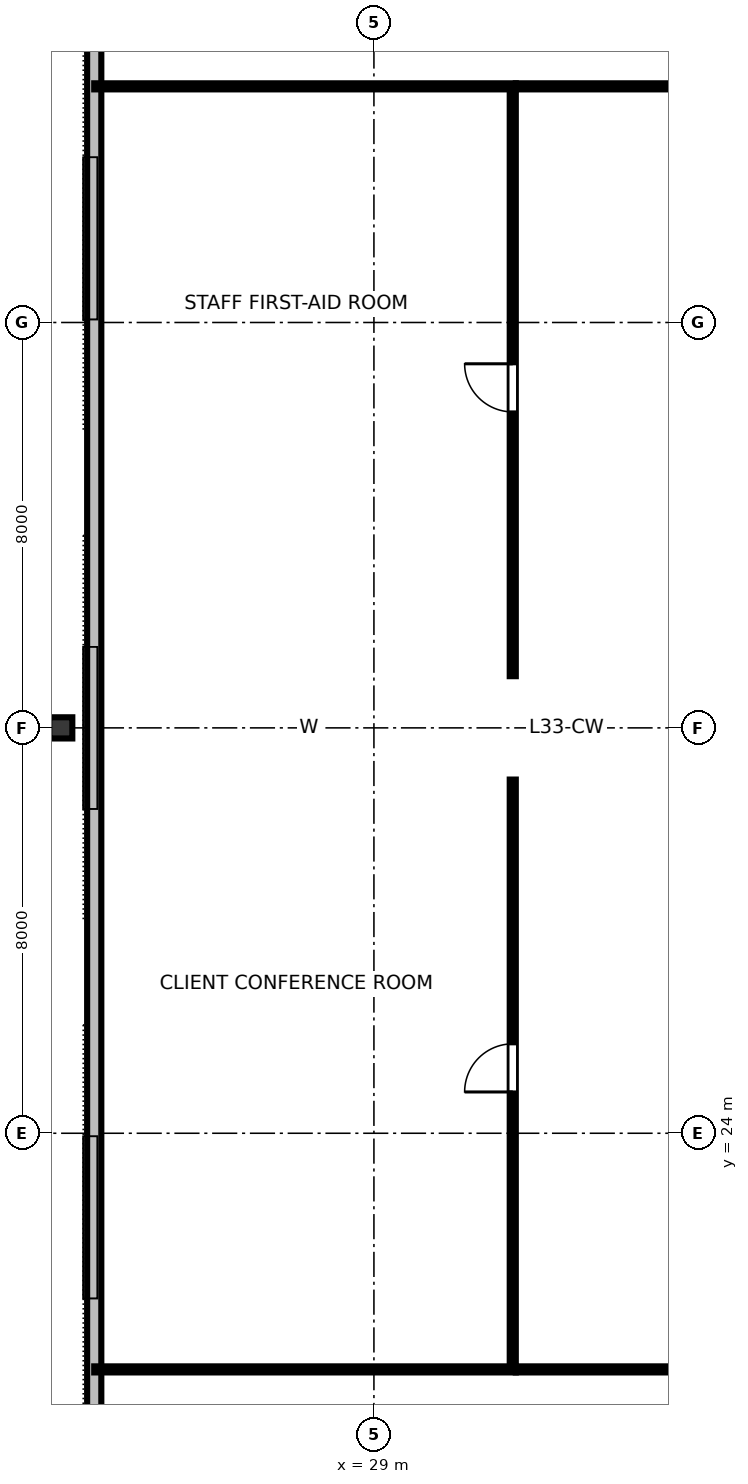
"""IFC4 building model, lengths in metres.
Left out: names, types, materials, properties, quantities, classifications, styles, units other than length and angle.
Written with IfcOpenShell. Run it as: python <this file> out.ifc"""

import sys

from ifc_helpers import new_model, si_unit, direction, frame, frame_2d, origin, origin_2d, place, context, subcontext, project, spatial, rectangle, i_section, extrude, element, fill, save


model = new_model("IFC4")
c1 = context("Model", 3, precision=1e-05, world=origin(), true_north=direction((0.0, 1.0)))
c2 = subcontext(c1, "Body", "Model", "MODEL_VIEW")
j1 = project(units=[si_unit("LENGTHUNIT", "METRE"), si_unit("PLANEANGLEUNIT", "RADIAN")], contexts=[c1])
p1 = place(None, origin())
s1 = spatial("IfcSite", under=j1, at=p1, CompositionType="ELEMENT")
p2 = place(p1, origin())
s2 = spatial("IfcBuilding", under=s1, at=p2, CompositionType="ELEMENT")
p3 = place(p2, frame((0.0, 0.0, 127.6)))
s3 = spatial("IfcBuildingStorey", under=s2, at=p3, CompositionType="ELEMENT", Elevation=127.6)
p4 = place(p3, frame((22.82, 32.0, 0.0), z_axis=(0.0, 0.0, 1.0), x_axis=(0.0, 1.0, 0.0)))
e1 = element("IfcColumn", 1, at=p4, inside=s3, PredefinedType="COLUMN", context=c2, shape_type="SweptSolid", body=[
    extrude(i_section(OverallWidth=0.418, OverallDepth=0.455, WebThickness=0.042, FlangeThickness=0.068, FilletRadius=0.025, at=origin_2d()), origin(), (0.0, 0.0, 1.0), 3.358),
])
p5 = place(p3, frame((23.48, 47.39, 0.0), z_axis=(0.0, 0.0, 1.0), x_axis=(0.0, -1.0, 0.0)))
e2 = element("IfcWall", 2, at=p5, inside=s3, PredefinedType="STANDARD", context=c2, shape_type="SweptSolid", body=[
    extrude(rectangle(XDim=30.78, YDim=0.28, at=frame_2d((15.39, 0.0))), origin(), (0.0, 0.0, 1.0), 3.36),
])
p6 = place(p3, frame((31.8, 19.34, 0.0), z_axis=(0.0, 0.0, 1.0), x_axis=(1.0, 0.0, 0.0)))
e3 = element("IfcWall", 3, at=p6, inside=s3, PredefinedType="PARTITIONING", context=c2, shape_type="SweptSolid", body=[
    extrude(rectangle(XDim=28.4, YDim=0.12, at=frame_2d((14.2, 0.0))), origin(), (0.0, 0.0, 1.0), 2.64),
])
p7 = place(p6, frame((4.955, 0.0, 0.0)))
e4 = element("IfcOpeningElement", 4, at=p7, cuts=e3, PredefinedType="OPENING", context=c2, shape_type="SweptSolid", body=[
    extrude(rectangle(XDim=0.95, YDim=2.15, at=frame_2d((0.475, 1.075))), frame((0.0, 0.07, 0.0), z_axis=(0.0, -1.0, 0.0), x_axis=(1.0, 0.0, 0.0)), (0.0, 0.0, 1.0), 0.14),
])
p8 = place(p6, frame((19.015, 0.0, 0.0)))
e5 = element("IfcOpeningElement", 5, at=p8, cuts=e3, PredefinedType="OPENING", context=c2, shape_type="SweptSolid", body=[
    extrude(rectangle(XDim=0.95, YDim=2.15, at=frame_2d((0.475, 1.075))), frame((0.0, 0.07, 0.0), z_axis=(0.0, -1.0, 0.0), x_axis=(1.0, 0.0, 0.0)), (0.0, 0.0, 1.0), 0.14),
])
p9 = place(p3, frame((31.8, 44.66, 0.0), z_axis=(0.0, 0.0, 1.0), x_axis=(1.0, 0.0, 0.0)))
e6 = element("IfcWall", 6, at=p9, inside=s3, PredefinedType="PARTITIONING", context=c2, shape_type="SweptSolid", body=[
    extrude(rectangle(XDim=28.4, YDim=0.12, at=frame_2d((14.2, 0.0))), origin(), (0.0, 0.0, 1.0), 2.64),
])
p10 = place(p9, frame((4.544, 0.0, 0.0)))
e7 = element("IfcOpeningElement", 7, at=p10, cuts=e6, PredefinedType="OPENING", context=c2, shape_type="SweptSolid", body=[
    extrude(rectangle(XDim=0.95, YDim=2.15, at=frame_2d((0.475, 1.075))), frame((0.0, 0.07, 0.0), z_axis=(0.0, -1.0, 0.0), x_axis=(1.0, 0.0, 0.0)), (0.0, 0.0, 1.0), 0.14),
])
p11 = place(p9, frame((11.807, 0.0, 0.0)))
e8 = element("IfcOpeningElement", 8, at=p11, cuts=e6, PredefinedType="OPENING", context=c2, shape_type="SweptSolid", body=[
    extrude(rectangle(XDim=0.95, YDim=2.15, at=frame_2d((0.475, 1.075))), frame((0.0, 0.07, 0.0), z_axis=(0.0, -1.0, 0.0), x_axis=(1.0, 0.0, 0.0)), (0.0, 0.0, 1.0), 0.14),
])
p12 = place(p9, frame((17.048, 0.0, 0.0)))
e9 = element("IfcOpeningElement", 9, at=p12, cuts=e6, PredefinedType="OPENING", context=c2, shape_type="SweptSolid", body=[
    extrude(rectangle(XDim=0.95, YDim=2.15, at=frame_2d((0.475, 1.075))), frame((0.0, 0.07, 0.0), z_axis=(0.0, -1.0, 0.0), x_axis=(1.0, 0.0, 0.0)), (0.0, 0.0, 1.0), 0.14),
])
p13 = place(p9, frame((23.845, 0.0, 0.0)))
e10 = element("IfcOpeningElement", 10, at=p13, cuts=e6, PredefinedType="OPENING", context=c2, shape_type="SweptSolid", body=[
    extrude(rectangle(XDim=0.95, YDim=2.15, at=frame_2d((0.475, 1.075))), frame((0.0, 0.07, 0.0), z_axis=(0.0, -1.0, 0.0), x_axis=(1.0, 0.0, 0.0)), (0.0, 0.0, 1.0), 0.14),
])
p14 = place(p3, frame((31.74, 19.4, 0.0), z_axis=(0.0, 0.0, 1.0), x_axis=(0.0, 1.0, 0.0)))
e11 = element("IfcWall", 11, at=p14, inside=s3, PredefinedType="PARTITIONING", context=c2, shape_type="SweptSolid", body=[
    extrude(rectangle(XDim=11.58, YDim=0.12, at=frame_2d((5.79, 0.0))), origin(), (0.0, 0.0, 1.0), 2.64),
])
p15 = place(p14, frame((5.415, 0.0, 0.0)))
e12 = element("IfcOpeningElement", 12, at=p15, cuts=e11, PredefinedType="OPENING", context=c2, shape_type="SweptSolid", body=[
    extrude(rectangle(XDim=0.95, YDim=2.15, at=frame_2d((0.475, 1.075))), frame((0.0, 0.07, 0.0), z_axis=(0.0, -1.0, 0.0), x_axis=(1.0, 0.0, 0.0)), (0.0, 0.0, 1.0), 0.14),
])
p16 = place(p3, frame((31.74, 33.02, 0.0), z_axis=(0.0, 0.0, 1.0), x_axis=(0.0, 1.0, 0.0)))
e13 = element("IfcWall", 13, at=p16, inside=s3, PredefinedType="PARTITIONING", context=c2, shape_type="SweptSolid", body=[
    extrude(rectangle(XDim=11.58, YDim=0.12, at=frame_2d((5.79, 0.0))), origin(), (0.0, 0.0, 1.0), 2.64),
])
p17 = place(p16, frame((5.215, 0.0, 0.0)))
e14 = element("IfcOpeningElement", 14, at=p17, cuts=e13, PredefinedType="OPENING", context=c2, shape_type="SweptSolid", body=[
    extrude(rectangle(XDim=0.95, YDim=2.15, at=frame_2d((0.475, 1.075))), frame((0.0, 0.07, 0.0), z_axis=(0.0, -1.0, 0.0), x_axis=(1.0, 0.0, 0.0)), (0.0, 0.0, 1.0), 0.14),
])
for number, where, z_axis, x_axis in (
    (15, (31.8, 19.34, 0.0), (0.0, 0.0, 1.0), (-1.0, 0.0, 0.0)),
    (16, (31.8, 44.66, 0.0), (0.0, 0.0, 1.0), (-1.0, 0.0, 0.0)),
):
    element("IfcWall", number, at=place(p3, frame(where, z_axis=z_axis, x_axis=x_axis)), inside=s3, PredefinedType="PARTITIONING", context=c2, shape_type="SweptSolid", body=[
        extrude(rectangle(XDim=8.32, YDim=0.12, at=frame_2d((4.16, 0.0))), origin(), (0.0, 0.0, 1.0), 2.64),
    ])
p18 = place(p15, origin())
e17 = element("IfcDoor", 17, at=p18, inside=s3, OperationType="SINGLE_SWING_LEFT", PredefinedType="DOOR", context=c2, shape_type="SweptSolid", body=[
    extrude(rectangle(XDim=0.95, YDim=2.15, at=frame_2d((0.475, 1.075))), frame((0.0, 0.025, 0.0), z_axis=(0.0, -1.0, 0.0), x_axis=(1.0, 0.0, 0.0)), (0.0, 0.0, 1.0), 0.05),
])
fill(e12, e17)
p19 = place(p17, origin())
e18 = element("IfcDoor", 18, at=p19, inside=s3, OperationType="SINGLE_SWING_RIGHT", PredefinedType="DOOR", context=c2, shape_type="SweptSolid", body=[
    extrude(rectangle(XDim=0.95, YDim=2.15, at=frame_2d((0.475, 1.075))), frame((0.0, 0.025, 0.0), z_axis=(0.0, -1.0, 0.0), x_axis=(1.0, 0.0, 0.0)), (0.0, 0.0, 1.0), 0.05),
])
fill(e14, e18)
save(model, sys.argv[1])
